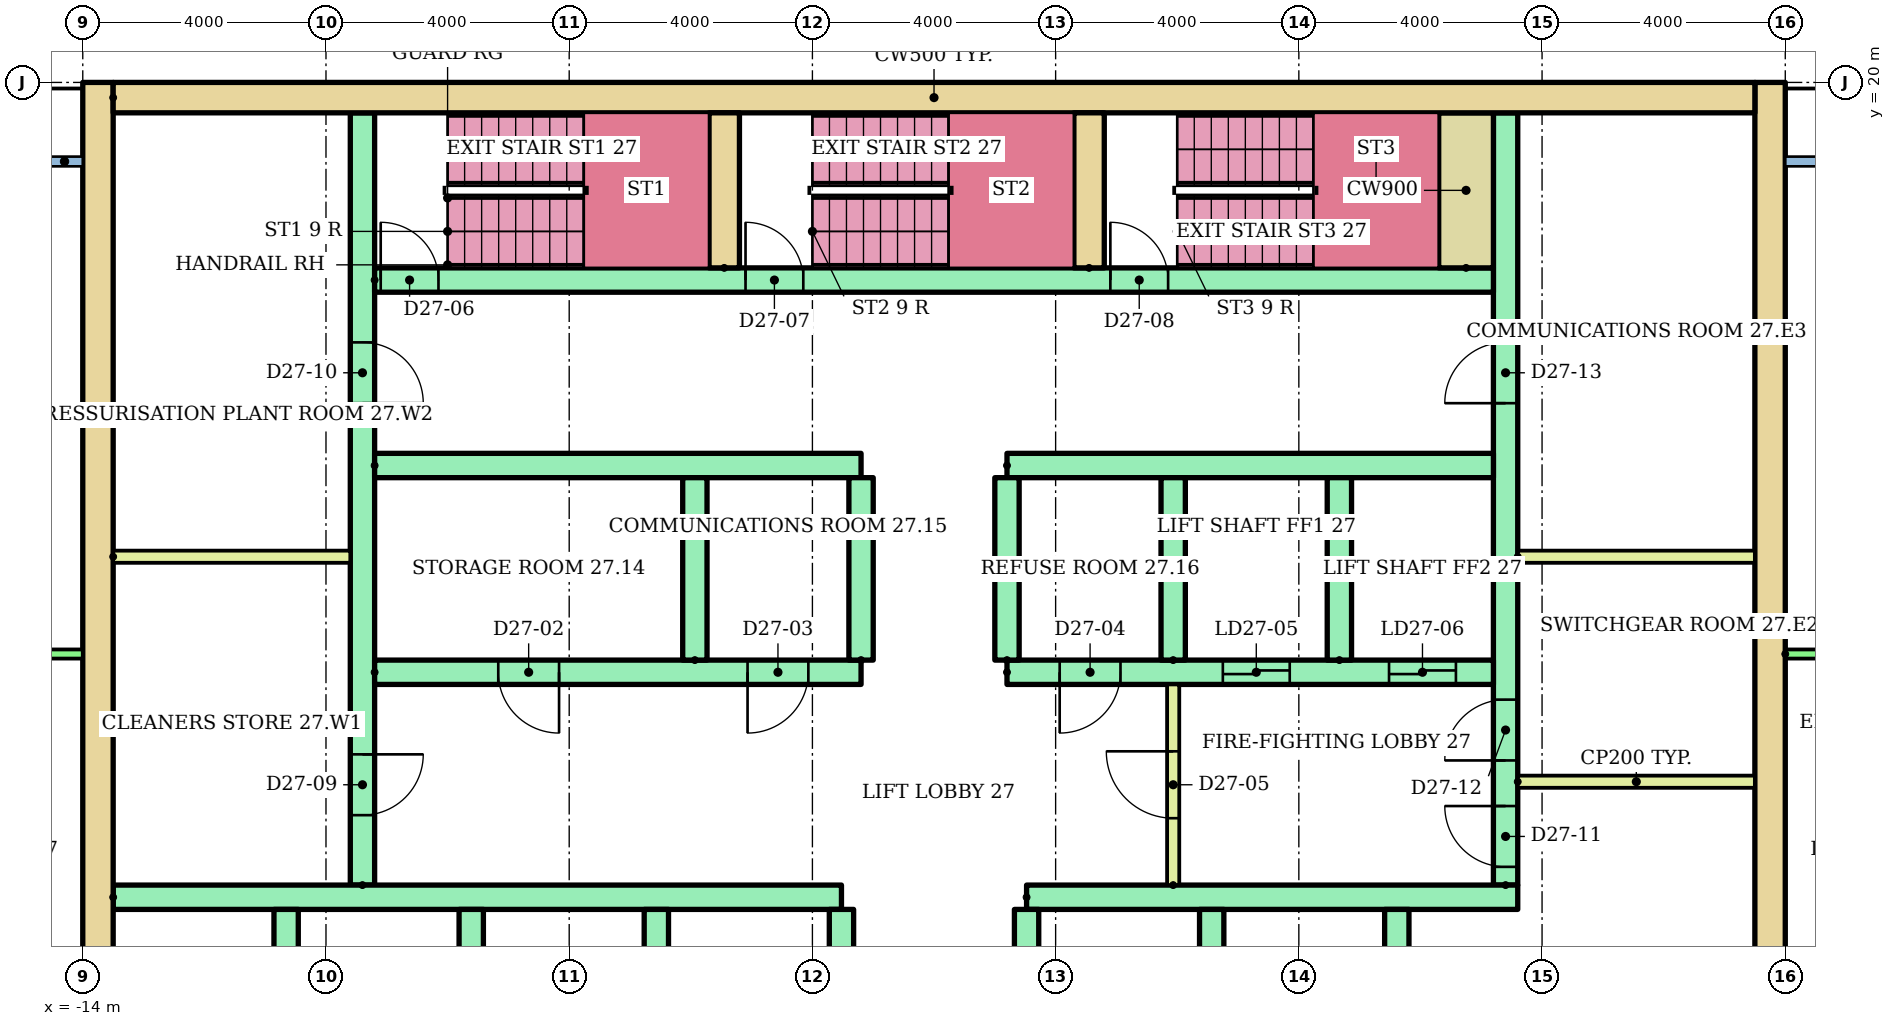
"""IFC4 building model, lengths in metres.
Left out: names, types, materials, properties, quantities, classifications, styles, units other than length and angle.
Written with IfcOpenShell. Run it as: python <this file> out.ifc"""

import sys

from ifc_helpers import new_model, si_unit, direction, frame, frame_2d, origin, place, context, subcontext, project, spatial, rectangle, extrude, element, fill, save


model = new_model("IFC4")
c1 = context("Model", 3, precision=1e-05, world=origin(), true_north=direction((0.0, 1.0)))
c2 = subcontext(c1, "Body", "Model", "MODEL_VIEW")
j1 = project(units=[si_unit("LENGTHUNIT", "METRE"), si_unit("PLANEANGLEUNIT", "RADIAN")], contexts=[c1])
p1 = place(None, origin())
s1 = spatial("IfcSite", under=j1, at=p1, CompositionType="ELEMENT")
p2 = place(p1, origin())
s2 = spatial("IfcBuilding", under=s1, at=p2, CompositionType="ELEMENT")
p3 = place(p2, frame((0.0, 0.0, 103.1)))
s3 = spatial("IfcBuildingStorey", under=s2, at=p3, CompositionType="ELEMENT", Elevation=103.1)
for number, where, z_axis, x_axis in (
    (1, (-13.75, 3.0, 0.0), (0.0, 0.0, 1.0), (0.0, 1.0, 0.0)),
    (2, (13.75, 3.0, 0.0), (0.0, 0.0, 1.0), (0.0, 1.0, 0.0)),
):
    element("IfcWall", number, at=place(p3, frame(where, z_axis=z_axis, x_axis=x_axis)), inside=s3, PredefinedType="SHEAR", context=c2, shape_type="SweptSolid", body=[
        extrude(rectangle(XDim=17.0, YDim=0.5, at=frame_2d((8.5, 0.0))), origin(), (0.0, 0.0, 1.0), 2.8),
    ])
p4 = place(p3, frame((-13.5, 19.75, 0.0)))
e3 = element("IfcWall", 3, at=p4, inside=s3, PredefinedType="SHEAR", context=c2, shape_type="SweptSolid", body=[
    extrude(rectangle(XDim=27.0, YDim=0.5, at=frame_2d((13.5, 0.0))), origin(), (0.0, 0.0, 1.0), 2.8),
])
p5 = place(p3, frame((-9.4, 6.8, 0.0), z_axis=(0.0, 0.0, 1.0), x_axis=(0.0, 1.0, 0.0)))
e4 = element("IfcWall", 4, at=p5, inside=s3, PredefinedType="SHEAR", context=c2, shape_type="SweptSolid", body=[
    extrude(rectangle(XDim=12.7, YDim=0.4, at=frame_2d((6.35, 0.0))), origin(), (0.0, 0.0, 1.0), 2.8),
])
p6 = place(p5, frame((1.15, 0.0, 0.0)))
e5 = element("IfcOpeningElement", 5, at=p6, cuts=e4, PredefinedType="OPENING", context=c2, shape_type="SweptSolid", body=[
    extrude(rectangle(XDim=1.0, YDim=2.1, at=frame_2d((0.5, 1.05))), frame((0.0, 0.21, 0.0), z_axis=(0.0, -1.0, 0.0), x_axis=(1.0, 0.0, 0.0)), (0.0, 0.0, 1.0), 0.42),
])
p7 = place(p5, frame((7.925, 0.0, 0.0)))
e6 = element("IfcOpeningElement", 6, at=p7, cuts=e4, PredefinedType="OPENING", context=c2, shape_type="SweptSolid", body=[
    extrude(rectangle(XDim=1.0, YDim=2.1, at=frame_2d((0.5, 1.05))), frame((0.0, 0.21, 0.0), z_axis=(0.0, -1.0, 0.0), x_axis=(1.0, 0.0, 0.0)), (0.0, 0.0, 1.0), 0.42),
])
p8 = place(p3, frame((9.4, 6.8, 0.0), z_axis=(0.0, 0.0, 1.0), x_axis=(0.0, 1.0, 0.0)))
e7 = element("IfcWall", 7, at=p8, inside=s3, PredefinedType="SHEAR", context=c2, shape_type="SweptSolid", body=[
    extrude(rectangle(XDim=12.7, YDim=0.4, at=frame_2d((6.35, 0.0))), origin(), (0.0, 0.0, 1.0), 2.8),
])
p9 = place(p8, frame((0.3, 0.0, 0.0)))
e8 = element("IfcOpeningElement", 8, at=p9, cuts=e7, PredefinedType="OPENING", context=c2, shape_type="SweptSolid", body=[
    extrude(rectangle(XDim=1.0, YDim=2.1, at=frame_2d((0.5, 1.05))), frame((0.0, 0.21, 0.0), z_axis=(0.0, -1.0, 0.0), x_axis=(1.0, 0.0, 0.0)), (0.0, 0.0, 1.0), 0.42),
])
p10 = place(p8, frame((2.05, 0.0, 0.0)))
e9 = element("IfcOpeningElement", 9, at=p10, cuts=e7, PredefinedType="OPENING", context=c2, shape_type="SweptSolid", body=[
    extrude(rectangle(XDim=1.0, YDim=2.1, at=frame_2d((0.5, 1.05))), frame((0.0, 0.21, 0.0), z_axis=(0.0, -1.0, 0.0), x_axis=(1.0, 0.0, 0.0)), (0.0, 0.0, 1.0), 0.42),
])
p11 = place(p8, frame((7.925, 0.0, 0.0)))
e10 = element("IfcOpeningElement", 10, at=p11, cuts=e7, PredefinedType="OPENING", context=c2, shape_type="SweptSolid", body=[
    extrude(rectangle(XDim=1.0, YDim=2.1, at=frame_2d((0.5, 1.05))), frame((0.0, 0.21, 0.0), z_axis=(0.0, -1.0, 0.0), x_axis=(1.0, 0.0, 0.0)), (0.0, 0.0, 1.0), 0.42),
])
p12 = place(p3, frame((-13.5, 6.6, 0.0)))
e11 = element("IfcWall", 11, at=p12, inside=s3, PredefinedType="SHEAR", context=c2, shape_type="SweptSolid", body=[
    extrude(rectangle(XDim=11.978, YDim=0.4, at=frame_2d((5.989, 0.0))), origin(), (0.0, 0.0, 1.0), 2.8),
])
p13 = place(p3, frame((1.522, 6.6, 0.0)))
e12 = element("IfcWall", 12, at=p13, inside=s3, PredefinedType="SHEAR", context=c2, shape_type="SweptSolid", body=[
    extrude(rectangle(XDim=8.078, YDim=0.4, at=frame_2d((4.039, 0.0))), origin(), (0.0, 0.0, 1.0), 2.8),
])
for number, where, z_axis, x_axis in (
    (13, (-10.656, 3.4, 0.0), (0.0, 0.0, 1.0), (0.0, 1.0, 0.0)),
    (14, (-7.611, 3.4, 0.0), (0.0, 0.0, 1.0), (0.0, 1.0, 0.0)),
    (15, (-4.567, 3.4, 0.0), (0.0, 0.0, 1.0), (0.0, 1.0, 0.0)),
    (16, (-1.522, 3.4, 0.0), (0.0, 0.0, 1.0), (0.0, 1.0, 0.0)),
    (17, (1.522, 3.4, 0.0), (0.0, 0.0, 1.0), (0.0, 1.0, 0.0)),
    (18, (4.567, 3.4, 0.0), (0.0, 0.0, 1.0), (0.0, 1.0, 0.0)),
    (19, (7.611, 3.4, 0.0), (0.0, 0.0, 1.0), (0.0, 1.0, 0.0)),
):
    element("IfcWall", number, at=place(p3, frame(where, z_axis=z_axis, x_axis=x_axis)), inside=s3, PredefinedType="SHEAR", context=c2, shape_type="SweptSolid", body=[
        extrude(rectangle(XDim=3.0, YDim=0.4, at=frame_2d((1.5, 0.0))), origin(), (0.0, 0.0, 1.0), 2.8),
    ])
p14 = place(p3, frame((-9.2, 10.3, 0.0)))
e20 = element("IfcWall", 20, at=p14, inside=s3, PredefinedType="SHEAR", context=c2, shape_type="SweptSolid", body=[
    extrude(rectangle(XDim=8.0, YDim=0.4, at=frame_2d((4.0, 0.0))), origin(), (0.0, 0.0, 1.0), 2.8),
])
p15 = place(p14, frame((2.033, 0.0, 0.0)))
e21 = element("IfcOpeningElement", 21, at=p15, cuts=e20, PredefinedType="OPENING", context=c2, shape_type="SweptSolid", body=[
    extrude(rectangle(XDim=1.0, YDim=2.1, at=frame_2d((0.5, 1.05))), frame((0.0, 0.21, 0.0), z_axis=(0.0, -1.0, 0.0), x_axis=(1.0, 0.0, 0.0)), (0.0, 0.0, 1.0), 0.42),
])
p16 = place(p14, frame((6.133, 0.0, 0.0)))
e22 = element("IfcOpeningElement", 22, at=p16, cuts=e20, PredefinedType="OPENING", context=c2, shape_type="SweptSolid", body=[
    extrude(rectangle(XDim=1.0, YDim=2.1, at=frame_2d((0.5, 1.05))), frame((0.0, 0.21, 0.0), z_axis=(0.0, -1.0, 0.0), x_axis=(1.0, 0.0, 0.0)), (0.0, 0.0, 1.0), 0.42),
])
p17 = place(p3, frame((-9.2, 13.7, 0.0)))
e23 = element("IfcWall", 23, at=p17, inside=s3, PredefinedType="SHEAR", context=c2, shape_type="SweptSolid", body=[
    extrude(rectangle(XDim=8.0, YDim=0.4, at=frame_2d((4.0, 0.0))), origin(), (0.0, 0.0, 1.0), 2.8),
])
p18 = place(p3, frame((1.2, 10.3, 0.0)))
e24 = element("IfcWall", 24, at=p18, inside=s3, PredefinedType="SHEAR", context=c2, shape_type="SweptSolid", body=[
    extrude(rectangle(XDim=8.0, YDim=0.4, at=frame_2d((4.0, 0.0))), origin(), (0.0, 0.0, 1.0), 2.8),
])
p19 = place(p18, frame((3.55, 0.0, 0.0)))
e25 = element("IfcOpeningElement", 25, at=p19, cuts=e24, PredefinedType="OPENING", context=c2, shape_type="SweptSolid", body=[
    extrude(rectangle(XDim=1.1, YDim=2.1, at=frame_2d((0.55, 1.05))), frame((0.0, 0.21, 0.0), z_axis=(0.0, -1.0, 0.0), x_axis=(1.0, 0.0, 0.0)), (0.0, 0.0, 1.0), 0.42),
])
p20 = place(p18, frame((6.283, 0.0, 0.0)))
e26 = element("IfcOpeningElement", 26, at=p20, cuts=e24, PredefinedType="OPENING", context=c2, shape_type="SweptSolid", body=[
    extrude(rectangle(XDim=1.1, YDim=2.1, at=frame_2d((0.55, 1.05))), frame((0.0, 0.21, 0.0), z_axis=(0.0, -1.0, 0.0), x_axis=(1.0, 0.0, 0.0)), (0.0, 0.0, 1.0), 0.42),
])
p21 = place(p18, frame((0.867, 0.0, 0.0)))
e27 = element("IfcOpeningElement", 27, at=p21, cuts=e24, PredefinedType="OPENING", context=c2, shape_type="SweptSolid", body=[
    extrude(rectangle(XDim=1.0, YDim=2.1, at=frame_2d((0.5, 1.05))), frame((0.0, 0.21, 0.0), z_axis=(0.0, -1.0, 0.0), x_axis=(1.0, 0.0, 0.0)), (0.0, 0.0, 1.0), 0.42),
])
p22 = place(p3, frame((1.2, 13.7, 0.0)))
e28 = element("IfcWall", 28, at=p22, inside=s3, PredefinedType="SHEAR", context=c2, shape_type="SweptSolid", body=[
    extrude(rectangle(XDim=8.0, YDim=0.4, at=frame_2d((4.0, 0.0))), origin(), (0.0, 0.0, 1.0), 2.8),
])
for number, where, z_axis, x_axis in (
    (29, (-3.933, 10.5, 0.0), (0.0, 0.0, 1.0), (0.0, 1.0, 0.0)),
    (30, (-1.2, 10.5, 0.0), (0.0, 0.0, 1.0), (0.0, 1.0, 0.0)),
    (31, (1.2, 10.5, 0.0), (0.0, 0.0, 1.0), (0.0, 1.0, 0.0)),
    (32, (3.933, 10.5, 0.0), (0.0, 0.0, 1.0), (0.0, 1.0, 0.0)),
    (33, (6.667, 10.5, 0.0), (0.0, 0.0, 1.0), (0.0, 1.0, 0.0)),
):
    element("IfcWall", number, at=place(p3, frame(where, z_axis=z_axis, x_axis=x_axis)), inside=s3, PredefinedType="SHEAR", context=c2, shape_type="SweptSolid", body=[
        extrude(rectangle(XDim=3.0, YDim=0.4, at=frame_2d((1.5, 0.0))), origin(), (0.0, 0.0, 1.0), 2.8),
    ])
p23 = place(p3, frame((3.933, 6.8, 0.0), z_axis=(0.0, 0.0, 1.0), x_axis=(0.0, 1.0, 0.0)))
e34 = element("IfcWall", 34, at=p23, inside=s3, PredefinedType="PARTITIONING", context=c2, shape_type="SweptSolid", body=[
    extrude(rectangle(XDim=3.3, YDim=0.2, at=frame_2d((1.65, 0.0))), origin(), (0.0, 0.0, 1.0), 2.8),
])
p24 = place(p23, frame((1.1, 0.0, 0.0)))
e35 = element("IfcOpeningElement", 35, at=p24, cuts=e34, PredefinedType="OPENING", context=c2, shape_type="SweptSolid", body=[
    extrude(rectangle(XDim=1.1, YDim=2.1, at=frame_2d((0.55, 1.05))), frame((0.0, 0.11, 0.0), z_axis=(0.0, -1.0, 0.0), x_axis=(1.0, 0.0, 0.0)), (0.0, 0.0, 1.0), 0.22),
])
p25 = place(p3, frame((-9.2, 16.75, 0.0)))
e36 = element("IfcWall", 36, at=p25, inside=s3, PredefinedType="SHEAR", context=c2, shape_type="SweptSolid", body=[
    extrude(rectangle(XDim=18.4, YDim=0.4, at=frame_2d((9.2, 0.0))), origin(), (0.0, 0.0, 1.0), 2.8),
])
p26 = place(p25, frame((0.1, 0.0, 0.0)))
e37 = element("IfcOpeningElement", 37, at=p26, cuts=e36, PredefinedType="OPENING", context=c2, shape_type="SweptSolid", body=[
    extrude(rectangle(XDim=0.95, YDim=2.1, at=frame_2d((0.475, 1.05))), frame((0.0, 0.21, 0.0), z_axis=(0.0, -1.0, 0.0), x_axis=(1.0, 0.0, 0.0)), (0.0, 0.0, 1.0), 0.42),
])
p27 = place(p25, frame((6.1, 0.0, 0.0)))
e38 = element("IfcOpeningElement", 38, at=p27, cuts=e36, PredefinedType="OPENING", context=c2, shape_type="SweptSolid", body=[
    extrude(rectangle(XDim=0.95, YDim=2.1, at=frame_2d((0.475, 1.05))), frame((0.0, 0.21, 0.0), z_axis=(0.0, -1.0, 0.0), x_axis=(1.0, 0.0, 0.0)), (0.0, 0.0, 1.0), 0.42),
])
p28 = place(p25, frame((12.1, 0.0, 0.0)))
e39 = element("IfcOpeningElement", 39, at=p28, cuts=e36, PredefinedType="OPENING", context=c2, shape_type="SweptSolid", body=[
    extrude(rectangle(XDim=0.95, YDim=2.1, at=frame_2d((0.475, 1.05))), frame((0.0, 0.21, 0.0), z_axis=(0.0, -1.0, 0.0), x_axis=(1.0, 0.0, 0.0)), (0.0, 0.0, 1.0), 0.42),
])
for number, where, z_axis, x_axis in (
    (40, (-3.45, 16.95, 0.0), (0.0, 0.0, 1.0), (0.0, 1.0, 0.0)),
    (41, (2.55, 16.95, 0.0), (0.0, 0.0, 1.0), (0.0, 1.0, 0.0)),
):
    element("IfcWall", number, at=place(p3, frame(where, z_axis=z_axis, x_axis=x_axis)), inside=s3, PredefinedType="SHEAR", context=c2, shape_type="SweptSolid", body=[
        extrude(rectangle(XDim=2.55, YDim=0.5, at=frame_2d((1.275, 0.0))), origin(), (0.0, 0.0, 1.0), 2.8),
    ])
p29 = place(p3, frame((8.75, 16.95, 0.0), z_axis=(0.0, 0.0, 1.0), x_axis=(0.0, 1.0, 0.0)))
e42 = element("IfcWall", 42, at=p29, inside=s3, PredefinedType="SHEAR", context=c2, shape_type="SweptSolid", body=[
    extrude(rectangle(XDim=2.55, YDim=0.9, at=frame_2d((1.275, 0.0))), origin(), (0.0, 0.0, 1.0), 2.8),
])
for number, where in (
    (43, (-13.5, 12.2, 0.0)),
    (44, (9.6, 8.5, 0.0)),
    (45, (9.6, 12.2, 0.0)),
):
    element("IfcWall", number, at=place(p3, frame(where)), inside=s3, PredefinedType="PARTITIONING", context=c2, shape_type="SweptSolid", body=[
        extrude(rectangle(XDim=3.9, YDim=0.2, at=frame_2d((1.95, 0.0))), origin(), (0.0, 0.0, 1.0), 2.8),
    ])
p30 = place(p3, frame((-28.62, 10.6, 0.0)))
e46 = element("IfcWall", 46, at=p30, inside=s3, PredefinedType="PARTITIONING", context=c2, shape_type="SweptSolid", body=[
    extrude(rectangle(XDim=14.62, YDim=0.15, at=frame_2d((7.31, 0.0))), origin(), (0.0, 0.0, 1.0), 2.4),
])
p31 = place(p30, frame((1.97, 0.0, 0.0)))
e47 = element("IfcOpeningElement", 47, at=p31, cuts=e46, PredefinedType="OPENING", context=c2, shape_type="SweptSolid", body=[
    extrude(rectangle(XDim=1.0, YDim=2.1, at=frame_2d((0.5, 1.05))), frame((0.0, 0.085, 0.0), z_axis=(0.0, -1.0, 0.0), x_axis=(1.0, 0.0, 0.0)), (0.0, 0.0, 1.0), 0.17),
])
p32 = place(p30, frame((9.22, 0.0, 0.0)))
e48 = element("IfcOpeningElement", 48, at=p32, cuts=e46, PredefinedType="OPENING", context=c2, shape_type="SweptSolid", body=[
    extrude(rectangle(XDim=0.9, YDim=2.1, at=frame_2d((0.45, 1.05))), frame((0.0, 0.085, 0.0), z_axis=(0.0, -1.0, 0.0), x_axis=(1.0, 0.0, 0.0)), (0.0, 0.0, 1.0), 0.17),
])
p33 = place(p3, frame((14.0, 10.6, 0.0)))
e49 = element("IfcWall", 49, at=p33, inside=s3, PredefinedType="PARTITIONING", context=c2, shape_type="SweptSolid", body=[
    extrude(rectangle(XDim=12.0, YDim=0.15, at=frame_2d((6.0, 0.0))), origin(), (0.0, 0.0, 1.0), 2.4),
])
p34 = place(p33, frame((1.5, 0.0, 0.0)))
e50 = element("IfcOpeningElement", 50, at=p34, cuts=e49, PredefinedType="OPENING", context=c2, shape_type="SweptSolid", body=[
    extrude(rectangle(XDim=1.0, YDim=2.1, at=frame_2d((0.5, 1.05))), frame((0.0, 0.085, 0.0), z_axis=(0.0, -1.0, 0.0), x_axis=(1.0, 0.0, 0.0)), (0.0, 0.0, 1.0), 0.17),
])
p35 = place(p33, frame((7.55, 0.0, 0.0)))
e51 = element("IfcOpeningElement", 51, at=p35, cuts=e49, PredefinedType="OPENING", context=c2, shape_type="SweptSolid", body=[
    extrude(rectangle(XDim=0.9, YDim=2.1, at=frame_2d((0.45, 1.05))), frame((0.0, 0.085, 0.0), z_axis=(0.0, -1.0, 0.0), x_axis=(1.0, 0.0, 0.0)), (0.0, 0.0, 1.0), 0.17),
])
p36 = place(p19, origin())
e52 = element("IfcDoor", 52, at=p36, inside=s3, OperationType="SLIDING_TO_LEFT", PredefinedType="DOOR", context=c2, shape_type="SweptSolid", body=[
    extrude(rectangle(XDim=1.1, YDim=2.1, at=frame_2d((0.55, 1.05))), frame((0.0, 0.025, 0.0), z_axis=(0.0, -1.0, 0.0), x_axis=(1.0, 0.0, 0.0)), (0.0, 0.0, 1.0), 0.05),
])
fill(e25, e52)
p37 = place(p20, origin())
e53 = element("IfcDoor", 53, at=p37, inside=s3, OperationType="SLIDING_TO_LEFT", PredefinedType="DOOR", context=c2, shape_type="SweptSolid", body=[
    extrude(rectangle(XDim=1.1, YDim=2.1, at=frame_2d((0.55, 1.05))), frame((0.0, 0.025, 0.0), z_axis=(0.0, -1.0, 0.0), x_axis=(1.0, 0.0, 0.0)), (0.0, 0.0, 1.0), 0.05),
])
fill(e26, e53)
p38 = place(p15, frame((1.0, 0.0, 0.0), z_axis=(0.0, 0.0, 1.0), x_axis=(-1.0, 0.0, 0.0)))
e54 = element("IfcDoor", 54, at=p38, inside=s3, OperationType="SINGLE_SWING_RIGHT", PredefinedType="DOOR", context=c2, shape_type="SweptSolid", body=[
    extrude(rectangle(XDim=1.0, YDim=2.1, at=frame_2d((0.5, 1.05))), frame((0.0, 0.025, 0.0), z_axis=(0.0, -1.0, 0.0), x_axis=(1.0, 0.0, 0.0)), (0.0, 0.0, 1.0), 0.05),
])
fill(e21, e54)
p39 = place(p16, frame((1.0, 0.0, 0.0), z_axis=(0.0, 0.0, 1.0), x_axis=(-1.0, 0.0, 0.0)))
e55 = element("IfcDoor", 55, at=p39, inside=s3, OperationType="SINGLE_SWING_LEFT", PredefinedType="DOOR", context=c2, shape_type="SweptSolid", body=[
    extrude(rectangle(XDim=1.0, YDim=2.1, at=frame_2d((0.5, 1.05))), frame((0.0, 0.025, 0.0), z_axis=(0.0, -1.0, 0.0), x_axis=(1.0, 0.0, 0.0)), (0.0, 0.0, 1.0), 0.05),
])
fill(e22, e55)
p40 = place(p21, frame((1.0, 0.0, 0.0), z_axis=(0.0, 0.0, 1.0), x_axis=(-1.0, 0.0, 0.0)))
e56 = element("IfcDoor", 56, at=p40, inside=s3, OperationType="SINGLE_SWING_LEFT", PredefinedType="DOOR", context=c2, shape_type="SweptSolid", body=[
    extrude(rectangle(XDim=1.0, YDim=2.1, at=frame_2d((0.5, 1.05))), frame((0.0, 0.025, 0.0), z_axis=(0.0, -1.0, 0.0), x_axis=(1.0, 0.0, 0.0)), (0.0, 0.0, 1.0), 0.05),
])
fill(e27, e56)
p41 = place(p24, origin())
e57 = element("IfcDoor", 57, at=p41, inside=s3, OperationType="SINGLE_SWING_RIGHT", PredefinedType="DOOR", context=c2, shape_type="SweptSolid", body=[
    extrude(rectangle(XDim=1.1, YDim=2.1, at=frame_2d((0.55, 1.05))), frame((0.0, 0.025, 0.0), z_axis=(0.0, -1.0, 0.0), x_axis=(1.0, 0.0, 0.0)), (0.0, 0.0, 1.0), 0.05),
])
fill(e35, e57)
p42 = place(p26, origin())
e58 = element("IfcDoor", 58, at=p42, inside=s3, OperationType="SINGLE_SWING_LEFT", PredefinedType="DOOR", context=c2, shape_type="SweptSolid", body=[
    extrude(rectangle(XDim=0.95, YDim=2.1, at=frame_2d((0.475, 1.05))), frame((0.0, 0.025, 0.0), z_axis=(0.0, -1.0, 0.0), x_axis=(1.0, 0.0, 0.0)), (0.0, 0.0, 1.0), 0.05),
])
fill(e37, e58)
p43 = place(p27, origin())
e59 = element("IfcDoor", 59, at=p43, inside=s3, OperationType="SINGLE_SWING_LEFT", PredefinedType="DOOR", context=c2, shape_type="SweptSolid", body=[
    extrude(rectangle(XDim=0.95, YDim=2.1, at=frame_2d((0.475, 1.05))), frame((0.0, 0.025, 0.0), z_axis=(0.0, -1.0, 0.0), x_axis=(1.0, 0.0, 0.0)), (0.0, 0.0, 1.0), 0.05),
])
fill(e38, e59)
p44 = place(p28, origin())
e60 = element("IfcDoor", 60, at=p44, inside=s3, OperationType="SINGLE_SWING_LEFT", PredefinedType="DOOR", context=c2, shape_type="SweptSolid", body=[
    extrude(rectangle(XDim=0.95, YDim=2.1, at=frame_2d((0.475, 1.05))), frame((0.0, 0.025, 0.0), z_axis=(0.0, -1.0, 0.0), x_axis=(1.0, 0.0, 0.0)), (0.0, 0.0, 1.0), 0.05),
])
fill(e39, e60)
p45 = place(p6, frame((1.0, 0.0, 0.0), z_axis=(0.0, 0.0, 1.0), x_axis=(-1.0, 0.0, 0.0)))
e61 = element("IfcDoor", 61, at=p45, inside=s3, OperationType="SINGLE_SWING_RIGHT", PredefinedType="DOOR", context=c2, shape_type="SweptSolid", body=[
    extrude(rectangle(XDim=1.0, YDim=2.1, at=frame_2d((0.5, 1.05))), frame((0.0, 0.025, 0.0), z_axis=(0.0, -1.0, 0.0), x_axis=(1.0, 0.0, 0.0)), (0.0, 0.0, 1.0), 0.05),
])
fill(e5, e61)
p46 = place(p7, frame((1.0, 0.0, 0.0), z_axis=(0.0, 0.0, 1.0), x_axis=(-1.0, 0.0, 0.0)))
e62 = element("IfcDoor", 62, at=p46, inside=s3, OperationType="SINGLE_SWING_LEFT", PredefinedType="DOOR", context=c2, shape_type="SweptSolid", body=[
    extrude(rectangle(XDim=1.0, YDim=2.1, at=frame_2d((0.5, 1.05))), frame((0.0, 0.025, 0.0), z_axis=(0.0, -1.0, 0.0), x_axis=(1.0, 0.0, 0.0)), (0.0, 0.0, 1.0), 0.05),
])
fill(e6, e62)
p47 = place(p9, origin())
e63 = element("IfcDoor", 63, at=p47, inside=s3, OperationType="SINGLE_SWING_RIGHT", PredefinedType="DOOR", context=c2, shape_type="SweptSolid", body=[
    extrude(rectangle(XDim=1.0, YDim=2.1, at=frame_2d((0.5, 1.05))), frame((0.0, 0.025, 0.0), z_axis=(0.0, -1.0, 0.0), x_axis=(1.0, 0.0, 0.0)), (0.0, 0.0, 1.0), 0.05),
])
fill(e8, e63)
p48 = place(p10, origin())
e64 = element("IfcDoor", 64, at=p48, inside=s3, OperationType="SINGLE_SWING_LEFT", PredefinedType="DOOR", context=c2, shape_type="SweptSolid", body=[
    extrude(rectangle(XDim=1.0, YDim=2.1, at=frame_2d((0.5, 1.05))), frame((0.0, 0.025, 0.0), z_axis=(0.0, -1.0, 0.0), x_axis=(1.0, 0.0, 0.0)), (0.0, 0.0, 1.0), 0.05),
])
fill(e9, e64)
p49 = place(p11, origin())
e65 = element("IfcDoor", 65, at=p49, inside=s3, OperationType="SINGLE_SWING_LEFT", PredefinedType="DOOR", context=c2, shape_type="SweptSolid", body=[
    extrude(rectangle(XDim=1.0, YDim=2.1, at=frame_2d((0.5, 1.05))), frame((0.0, 0.025, 0.0), z_axis=(0.0, -1.0, 0.0), x_axis=(1.0, 0.0, 0.0)), (0.0, 0.0, 1.0), 0.05),
])
fill(e10, e65)
save(model, sys.argv[1])
